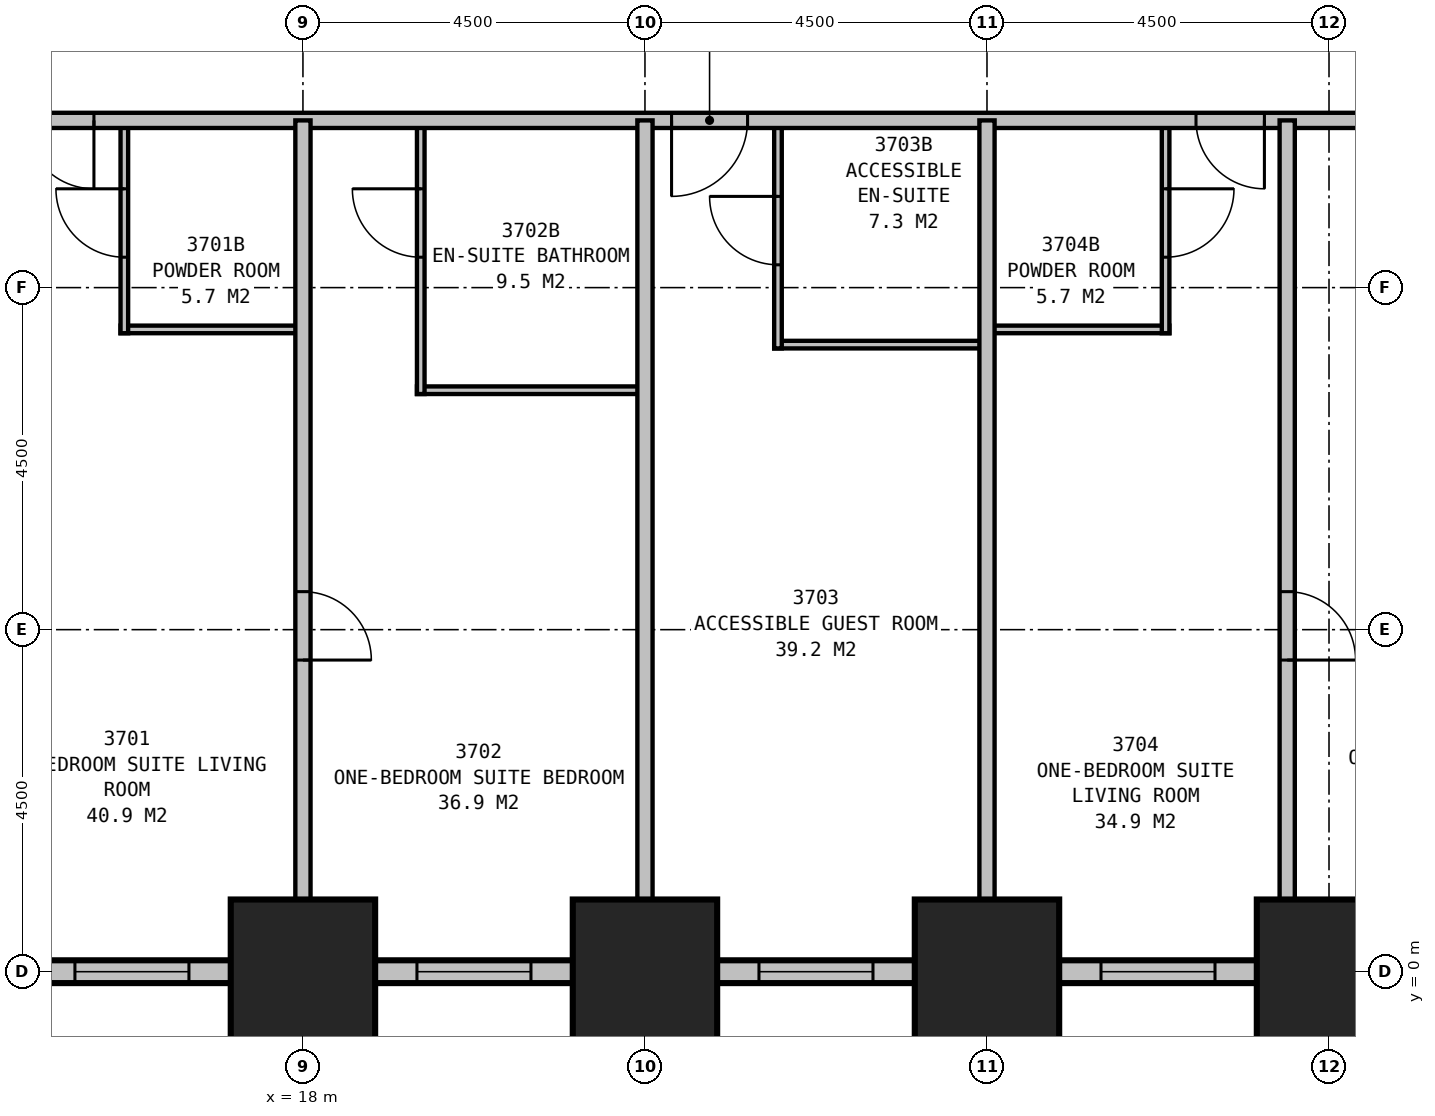
"""IFC4 building model, lengths in metres.
Left out: names, types, materials, properties, quantities, classifications, styles, units other than length and angle.
Written with IfcOpenShell. Run it as: python <this file> out.ifc"""

import sys

from ifc_helpers import new_model, si_unit, direction, frame, frame_2d, origin, origin_2d, place, context, subcontext, project, spatial, rectangle, extrude, element, fill, save


model = new_model("IFC4")
c1 = context("Model", 3, precision=1e-05, world=origin(), true_north=direction((0.0, 1.0)))
c2 = subcontext(c1, "Body", "Model", "MODEL_VIEW")
j1 = project(units=[si_unit("LENGTHUNIT", "METRE"), si_unit("PLANEANGLEUNIT", "RADIAN")], contexts=[c1])
p1 = place(None, origin())
s1 = spatial("IfcSite", under=j1, at=p1, CompositionType="ELEMENT")
p2 = place(p1, origin())
s2 = spatial("IfcBuilding", under=s1, at=p2, CompositionType="ELEMENT")
p3 = place(p2, frame((0.0, 0.0, 142.4)))
s3 = spatial("IfcBuildingStorey", under=s2, at=p3, CompositionType="ELEMENT", Elevation=142.4)
for number, where, z_axis, x_axis in (
    (1, (18.0, 0.0, 0.0), (0.0, 0.0, 1.0), (1.0, 0.0, 0.0)),
    (2, (22.5, 0.0, 0.0), (0.0, 0.0, 1.0), (1.0, 0.0, 0.0)),
    (3, (27.0, 0.0, 0.0), (0.0, 0.0, 1.0), (1.0, 0.0, 0.0)),
    (4, (31.5, 0.0, 0.0), (0.0, 0.0, 1.0), (1.0, 0.0, 0.0)),
):
    element("IfcColumn", number, at=place(p3, frame(where, z_axis=z_axis, x_axis=x_axis)), inside=s3, PredefinedType="COLUMN", context=c2, shape_type="SweptSolid", body=[
        extrude(rectangle(XDim=1.9, YDim=1.9, at=origin_2d()), origin(), (0.0, 0.0, 1.0), 3.5),
    ])
p4 = place(p3, frame((4.35, 0.0, 0.0), z_axis=(0.0, 0.0, 1.0), x_axis=(1.0, 0.0, 0.0)))
e5 = element("IfcWall", 5, at=p4, inside=s3, PredefinedType="STANDARD", context=c2, shape_type="SweptSolid", body=[
    extrude(rectangle(XDim=40.8, YDim=0.3, at=frame_2d((20.4, 0.0))), origin(), (0.0, 0.0, 1.0), 2.1),
])
p5 = place(p4, frame((1.65, 0.0, 0.5)))
e6 = element("IfcOpeningElement", 6, at=p5, cuts=e5, PredefinedType="OPENING", context=c2, shape_type="SweptSolid", body=[
    extrude(rectangle(XDim=1.5, YDim=1.4, at=frame_2d((0.75, 0.7))), frame((0.0, 0.16, 0.0), z_axis=(0.0, -1.0, 0.0), x_axis=(1.0, 0.0, 0.0)), (0.0, 0.0, 1.0), 0.32),
])
p6 = place(p4, frame((6.15, 0.0, 0.5)))
e7 = element("IfcOpeningElement", 7, at=p6, cuts=e5, PredefinedType="OPENING", context=c2, shape_type="SweptSolid", body=[
    extrude(rectangle(XDim=1.5, YDim=1.4, at=frame_2d((0.75, 0.7))), frame((0.0, 0.16, 0.0), z_axis=(0.0, -1.0, 0.0), x_axis=(1.0, 0.0, 0.0)), (0.0, 0.0, 1.0), 0.32),
])
p7 = place(p4, frame((10.65, 0.0, 0.5)))
e8 = element("IfcOpeningElement", 8, at=p7, cuts=e5, PredefinedType="OPENING", context=c2, shape_type="SweptSolid", body=[
    extrude(rectangle(XDim=1.5, YDim=1.4, at=frame_2d((0.75, 0.7))), frame((0.0, 0.16, 0.0), z_axis=(0.0, -1.0, 0.0), x_axis=(1.0, 0.0, 0.0)), (0.0, 0.0, 1.0), 0.32),
])
p8 = place(p4, frame((15.15, 0.0, 0.5)))
e9 = element("IfcOpeningElement", 9, at=p8, cuts=e5, PredefinedType="OPENING", context=c2, shape_type="SweptSolid", body=[
    extrude(rectangle(XDim=1.5, YDim=1.4, at=frame_2d((0.75, 0.7))), frame((0.0, 0.16, 0.0), z_axis=(0.0, -1.0, 0.0), x_axis=(1.0, 0.0, 0.0)), (0.0, 0.0, 1.0), 0.32),
])
p9 = place(p4, frame((19.65, 0.0, 0.5)))
e10 = element("IfcOpeningElement", 10, at=p9, cuts=e5, PredefinedType="OPENING", context=c2, shape_type="SweptSolid", body=[
    extrude(rectangle(XDim=1.5, YDim=1.4, at=frame_2d((0.75, 0.7))), frame((0.0, 0.16, 0.0), z_axis=(0.0, -1.0, 0.0), x_axis=(1.0, 0.0, 0.0)), (0.0, 0.0, 1.0), 0.32),
])
p10 = place(p4, frame((24.15, 0.0, 0.5)))
e11 = element("IfcOpeningElement", 11, at=p10, cuts=e5, PredefinedType="OPENING", context=c2, shape_type="SweptSolid", body=[
    extrude(rectangle(XDim=1.5, YDim=1.4, at=frame_2d((0.75, 0.7))), frame((0.0, 0.16, 0.0), z_axis=(0.0, -1.0, 0.0), x_axis=(1.0, 0.0, 0.0)), (0.0, 0.0, 1.0), 0.32),
])
p11 = place(p4, frame((28.65, 0.0, 0.5)))
e12 = element("IfcOpeningElement", 12, at=p11, cuts=e5, PredefinedType="OPENING", context=c2, shape_type="SweptSolid", body=[
    extrude(rectangle(XDim=1.5, YDim=1.4, at=frame_2d((0.75, 0.7))), frame((0.0, 0.16, 0.0), z_axis=(0.0, -1.0, 0.0), x_axis=(1.0, 0.0, 0.0)), (0.0, 0.0, 1.0), 0.32),
])
p12 = place(p4, frame((33.15, 0.0, 0.5)))
e13 = element("IfcOpeningElement", 13, at=p12, cuts=e5, PredefinedType="OPENING", context=c2, shape_type="SweptSolid", body=[
    extrude(rectangle(XDim=1.5, YDim=1.4, at=frame_2d((0.75, 0.7))), frame((0.0, 0.16, 0.0), z_axis=(0.0, -1.0, 0.0), x_axis=(1.0, 0.0, 0.0)), (0.0, 0.0, 1.0), 0.32),
])
p13 = place(p4, frame((37.65, 0.0, 0.5)))
e14 = element("IfcOpeningElement", 14, at=p13, cuts=e5, PredefinedType="OPENING", context=c2, shape_type="SweptSolid", body=[
    extrude(rectangle(XDim=1.5, YDim=1.4, at=frame_2d((0.75, 0.7))), frame((0.0, 0.16, 0.0), z_axis=(0.0, -1.0, 0.0), x_axis=(1.0, 0.0, 0.0)), (0.0, 0.0, 1.0), 0.32),
])
p14 = place(p3, frame((11.2, 11.2, 0.0), z_axis=(0.0, 0.0, 1.0), x_axis=(1.0, 0.0, 0.0)))
e15 = element("IfcWall", 15, at=p14, inside=s3, PredefinedType="PARTITIONING", context=c2, shape_type="SweptSolid", body=[
    extrude(rectangle(XDim=27.1, YDim=0.2, at=frame_2d((13.55, 0.0))), origin(), (0.0, 0.0, 1.0), 3.25),
])
p15 = place(p14, frame((4.05, 0.0, 0.0), z_axis=(0.0, 0.0, 1.0), x_axis=(-1.0, 0.0, 0.0)))
e16 = element("IfcOpeningElement", 16, at=p15, cuts=e15, PredefinedType="OPENING", context=c2, shape_type="SweptSolid", body=[
    extrude(rectangle(XDim=0.9, YDim=2.1, at=frame_2d((0.45, 1.05))), frame((0.0, 0.11, 0.0), z_axis=(0.0, -1.0, 0.0), x_axis=(1.0, 0.0, 0.0)), (0.0, 0.0, 1.0), 0.22),
])
p16 = place(p14, frame((12.65, 0.0, 0.0), z_axis=(0.0, 0.0, 1.0), x_axis=(-1.0, 0.0, 0.0)))
e17 = element("IfcOpeningElement", 17, at=p16, cuts=e15, PredefinedType="OPENING", context=c2, shape_type="SweptSolid", body=[
    extrude(rectangle(XDim=1.0, YDim=2.1, at=frame_2d((0.5, 1.05))), frame((0.0, 0.11, 0.0), z_axis=(0.0, -1.0, 0.0), x_axis=(1.0, 0.0, 0.0)), (0.0, 0.0, 1.0), 0.22),
])
p17 = place(p14, frame((19.45, 0.0, 0.0), z_axis=(0.0, 0.0, 1.0), x_axis=(-1.0, 0.0, 0.0)))
e18 = element("IfcOpeningElement", 18, at=p17, cuts=e15, PredefinedType="OPENING", context=c2, shape_type="SweptSolid", body=[
    extrude(rectangle(XDim=0.9, YDim=2.1, at=frame_2d((0.45, 1.05))), frame((0.0, 0.11, 0.0), z_axis=(0.0, -1.0, 0.0), x_axis=(1.0, 0.0, 0.0)), (0.0, 0.0, 1.0), 0.22),
])
p18 = place(p14, frame((1.6, 0.0, 0.0), z_axis=(0.0, 0.0, 1.0), x_axis=(-1.0, 0.0, 0.0)))
e19 = element("IfcOpeningElement", 19, at=p18, cuts=e15, PredefinedType="OPENING", context=c2, shape_type="SweptSolid", body=[
    extrude(rectangle(XDim=0.9, YDim=2.1, at=frame_2d((0.45, 1.05))), frame((0.0, 0.11, 0.0), z_axis=(0.0, -1.0, 0.0), x_axis=(1.0, 0.0, 0.0)), (0.0, 0.0, 1.0), 0.22),
])
p19 = place(p14, frame((26.4, 0.0, 0.0), z_axis=(0.0, 0.0, 1.0), x_axis=(-1.0, 0.0, 0.0)))
e20 = element("IfcOpeningElement", 20, at=p19, cuts=e15, PredefinedType="OPENING", context=c2, shape_type="SweptSolid", body=[
    extrude(rectangle(XDim=0.9, YDim=2.1, at=frame_2d((0.45, 1.05))), frame((0.0, 0.11, 0.0), z_axis=(0.0, -1.0, 0.0), x_axis=(1.0, 0.0, 0.0)), (0.0, 0.0, 1.0), 0.22),
])
p20 = place(p3, frame((18.0, 11.2, 0.0), z_axis=(0.0, 0.0, 1.0), x_axis=(0.0, -1.0, 0.0)))
e21 = element("IfcWall", 21, at=p20, inside=s3, PredefinedType="PARTITIONING", context=c2, shape_type="SweptSolid", body=[
    extrude(rectangle(XDim=11.2, YDim=0.2, at=frame_2d((5.6, 0.0))), origin(), (0.0, 0.0, 1.0), 2.2),
])
p21 = place(p20, frame((6.2, 0.0, 0.0)))
e22 = element("IfcOpeningElement", 22, at=p21, cuts=e21, PredefinedType="OPENING", context=c2, shape_type="SweptSolid", body=[
    extrude(rectangle(XDim=0.9, YDim=2.1, at=frame_2d((0.45, 1.05))), frame((0.0, 0.11, 0.0), z_axis=(0.0, -1.0, 0.0), x_axis=(1.0, 0.0, 0.0)), (0.0, 0.0, 1.0), 0.22),
])
for number, where, z_axis, x_axis in (
    (23, (22.5, 11.2, 0.0), (0.0, 0.0, 1.0), (0.0, -1.0, 0.0)),
    (24, (27.0, 11.2, 0.0), (0.0, 0.0, 1.0), (0.0, -1.0, 0.0)),
):
    element("IfcWall", number, at=place(p3, frame(where, z_axis=z_axis, x_axis=x_axis)), inside=s3, PredefinedType="PARTITIONING", context=c2, shape_type="SweptSolid", body=[
        extrude(rectangle(XDim=11.2, YDim=0.2, at=frame_2d((5.6, 0.0))), origin(), (0.0, 0.0, 1.0), 2.2),
    ])
p22 = place(p3, frame((30.95, 11.2, 0.0), z_axis=(0.0, 0.0, 1.0), x_axis=(0.0, -1.0, 0.0)))
e25 = element("IfcWall", 25, at=p22, inside=s3, PredefinedType="PARTITIONING", context=c2, shape_type="SweptSolid", body=[
    extrude(rectangle(XDim=11.2, YDim=0.2, at=frame_2d((5.6, 0.0))), origin(), (0.0, 0.0, 1.0), 2.2),
])
p23 = place(p22, frame((6.2, 0.0, 0.0)))
e26 = element("IfcOpeningElement", 26, at=p23, cuts=e25, PredefinedType="OPENING", context=c2, shape_type="SweptSolid", body=[
    extrude(rectangle(XDim=0.9, YDim=2.1, at=frame_2d((0.45, 1.05))), frame((0.0, 0.11, 0.0), z_axis=(0.0, -1.0, 0.0), x_axis=(1.0, 0.0, 0.0)), (0.0, 0.0, 1.0), 0.22),
])
p24 = place(p3, frame((15.6, 8.45, 0.0), z_axis=(0.0, 0.0, 1.0), x_axis=(1.0, 0.0, 0.0)))
e27 = element("IfcWall", 27, at=p24, inside=s3, PredefinedType="PLUMBINGWALL", context=c2, shape_type="SweptSolid", body=[
    extrude(rectangle(XDim=2.4, YDim=0.1, at=frame_2d((1.2, 0.0))), origin(), (0.0, 0.0, 1.0), 3.25),
])
p25 = place(p3, frame((15.65, 11.2, 0.0), z_axis=(0.0, 0.0, 1.0), x_axis=(0.0, -1.0, 0.0)))
e28 = element("IfcWall", 28, at=p25, inside=s3, PredefinedType="PLUMBINGWALL", context=c2, shape_type="SweptSolid", body=[
    extrude(rectangle(XDim=2.8, YDim=0.1, at=frame_2d((1.4, 0.0))), origin(), (0.0, 0.0, 1.0), 3.25),
])
p26 = place(p25, frame((1.8, 0.0, 0.0), z_axis=(0.0, 0.0, 1.0), x_axis=(-1.0, 0.0, 0.0)))
e29 = element("IfcOpeningElement", 29, at=p26, cuts=e28, PredefinedType="OPENING", context=c2, shape_type="SweptSolid", body=[
    extrude(rectangle(XDim=0.9, YDim=2.1, at=frame_2d((0.45, 1.05))), frame((0.0, 0.06, 0.0), z_axis=(0.0, -1.0, 0.0), x_axis=(1.0, 0.0, 0.0)), (0.0, 0.0, 1.0), 0.12),
])
p27 = place(p3, frame((19.5, 7.65, 0.0), z_axis=(0.0, 0.0, 1.0), x_axis=(1.0, 0.0, 0.0)))
e30 = element("IfcWall", 30, at=p27, inside=s3, PredefinedType="PLUMBINGWALL", context=c2, shape_type="SweptSolid", body=[
    extrude(rectangle(XDim=3.0, YDim=0.1, at=frame_2d((1.5, 0.0))), origin(), (0.0, 0.0, 1.0), 3.25),
])
p28 = place(p3, frame((19.55, 11.2, 0.0), z_axis=(0.0, 0.0, 1.0), x_axis=(0.0, -1.0, 0.0)))
e31 = element("IfcWall", 31, at=p28, inside=s3, PredefinedType="PLUMBINGWALL", context=c2, shape_type="SweptSolid", body=[
    extrude(rectangle(XDim=3.6, YDim=0.1, at=frame_2d((1.8, 0.0))), origin(), (0.0, 0.0, 1.0), 3.25),
])
p29 = place(p28, frame((1.8, 0.0, 0.0), z_axis=(0.0, 0.0, 1.0), x_axis=(-1.0, 0.0, 0.0)))
e32 = element("IfcOpeningElement", 32, at=p29, cuts=e31, PredefinedType="OPENING", context=c2, shape_type="SweptSolid", body=[
    extrude(rectangle(XDim=0.9, YDim=2.1, at=frame_2d((0.45, 1.05))), frame((0.0, 0.06, 0.0), z_axis=(0.0, -1.0, 0.0), x_axis=(1.0, 0.0, 0.0)), (0.0, 0.0, 1.0), 0.12),
])
p30 = place(p3, frame((24.2, 8.25, 0.0), z_axis=(0.0, 0.0, 1.0), x_axis=(1.0, 0.0, 0.0)))
e33 = element("IfcWall", 33, at=p30, inside=s3, PredefinedType="PLUMBINGWALL", context=c2, shape_type="SweptSolid", body=[
    extrude(rectangle(XDim=2.8, YDim=0.1, at=frame_2d((1.4, 0.0))), origin(), (0.0, 0.0, 1.0), 3.25),
])
p31 = place(p3, frame((24.25, 11.2, 0.0), z_axis=(0.0, 0.0, 1.0), x_axis=(0.0, -1.0, 0.0)))
e34 = element("IfcWall", 34, at=p31, inside=s3, PredefinedType="PLUMBINGWALL", context=c2, shape_type="SweptSolid", body=[
    extrude(rectangle(XDim=3.0, YDim=0.1, at=frame_2d((1.5, 0.0))), origin(), (0.0, 0.0, 1.0), 3.25),
])
p32 = place(p31, frame((1.9, 0.0, 0.0), z_axis=(0.0, 0.0, 1.0), x_axis=(-1.0, 0.0, 0.0)))
e35 = element("IfcOpeningElement", 35, at=p32, cuts=e34, PredefinedType="OPENING", context=c2, shape_type="SweptSolid", body=[
    extrude(rectangle(XDim=0.9, YDim=2.1, at=frame_2d((0.45, 1.05))), frame((0.0, 0.06, 0.0), z_axis=(0.0, -1.0, 0.0), x_axis=(1.0, 0.0, 0.0)), (0.0, 0.0, 1.0), 0.12),
])
p33 = place(p3, frame((27.0, 8.45, 0.0), z_axis=(0.0, 0.0, 1.0), x_axis=(1.0, 0.0, 0.0)))
e36 = element("IfcWall", 36, at=p33, inside=s3, PredefinedType="PLUMBINGWALL", context=c2, shape_type="SweptSolid", body=[
    extrude(rectangle(XDim=2.4, YDim=0.1, at=frame_2d((1.2, 0.0))), origin(), (0.0, 0.0, 1.0), 3.25),
])
p34 = place(p3, frame((29.35, 11.2, 0.0), z_axis=(0.0, 0.0, 1.0), x_axis=(0.0, -1.0, 0.0)))
e37 = element("IfcWall", 37, at=p34, inside=s3, PredefinedType="PLUMBINGWALL", context=c2, shape_type="SweptSolid", body=[
    extrude(rectangle(XDim=2.8, YDim=0.1, at=frame_2d((1.4, 0.0))), origin(), (0.0, 0.0, 1.0), 3.25),
])
p35 = place(p34, frame((0.9, 0.0, 0.0)))
e38 = element("IfcOpeningElement", 38, at=p35, cuts=e37, PredefinedType="OPENING", context=c2, shape_type="SweptSolid", body=[
    extrude(rectangle(XDim=0.9, YDim=2.1, at=frame_2d((0.45, 1.05))), frame((0.0, 0.06, 0.0), z_axis=(0.0, -1.0, 0.0), x_axis=(1.0, 0.0, 0.0)), (0.0, 0.0, 1.0), 0.12),
])
p36 = place(p7, origin())
e39 = element("IfcWindow", 39, at=p36, inside=s3, PartitioningType="SINGLE_PANEL", PredefinedType="WINDOW", context=c2, shape_type="SweptSolid", body=[
    extrude(rectangle(XDim=1.5, YDim=1.4, at=frame_2d((0.75, 0.7))), frame((0.0, 0.03, 0.0), z_axis=(0.0, -1.0, 0.0), x_axis=(1.0, 0.0, 0.0)), (0.0, 0.0, 1.0), 0.06),
])
fill(e8, e39)
p37 = place(p8, origin())
e40 = element("IfcWindow", 40, at=p37, inside=s3, PartitioningType="SINGLE_PANEL", PredefinedType="WINDOW", context=c2, shape_type="SweptSolid", body=[
    extrude(rectangle(XDim=1.5, YDim=1.4, at=frame_2d((0.75, 0.7))), frame((0.0, 0.03, 0.0), z_axis=(0.0, -1.0, 0.0), x_axis=(1.0, 0.0, 0.0)), (0.0, 0.0, 1.0), 0.06),
])
fill(e9, e40)
p38 = place(p9, origin())
e41 = element("IfcWindow", 41, at=p38, inside=s3, PartitioningType="SINGLE_PANEL", PredefinedType="WINDOW", context=c2, shape_type="SweptSolid", body=[
    extrude(rectangle(XDim=1.5, YDim=1.4, at=frame_2d((0.75, 0.7))), frame((0.0, 0.03, 0.0), z_axis=(0.0, -1.0, 0.0), x_axis=(1.0, 0.0, 0.0)), (0.0, 0.0, 1.0), 0.06),
])
fill(e10, e41)
p39 = place(p10, origin())
e42 = element("IfcWindow", 42, at=p39, inside=s3, PartitioningType="SINGLE_PANEL", PredefinedType="WINDOW", context=c2, shape_type="SweptSolid", body=[
    extrude(rectangle(XDim=1.5, YDim=1.4, at=frame_2d((0.75, 0.7))), frame((0.0, 0.03, 0.0), z_axis=(0.0, -1.0, 0.0), x_axis=(1.0, 0.0, 0.0)), (0.0, 0.0, 1.0), 0.06),
])
fill(e11, e42)
p40 = place(p15, origin())
e43 = element("IfcDoor", 43, at=p40, inside=s3, OperationType="SINGLE_SWING_LEFT", PredefinedType="DOOR", context=c2, shape_type="SweptSolid", body=[
    extrude(rectangle(XDim=0.9, YDim=2.1, at=frame_2d((0.45, 1.05))), frame((0.0, 0.025, 0.0), z_axis=(0.0, -1.0, 0.0), x_axis=(1.0, 0.0, 0.0)), (0.0, 0.0, 1.0), 0.05),
])
fill(e16, e43)
p41 = place(p16, origin())
e44 = element("IfcDoor", 44, at=p41, inside=s3, OperationType="SINGLE_SWING_RIGHT", PredefinedType="DOOR", context=c2, shape_type="SweptSolid", body=[
    extrude(rectangle(XDim=1.0, YDim=2.1, at=frame_2d((0.5, 1.05))), frame((0.0, 0.025, 0.0), z_axis=(0.0, -1.0, 0.0), x_axis=(1.0, 0.0, 0.0)), (0.0, 0.0, 1.0), 0.05),
])
fill(e17, e44)
p42 = place(p17, origin())
e45 = element("IfcDoor", 45, at=p42, inside=s3, OperationType="SINGLE_SWING_LEFT", PredefinedType="DOOR", context=c2, shape_type="SweptSolid", body=[
    extrude(rectangle(XDim=0.9, YDim=2.1, at=frame_2d((0.45, 1.05))), frame((0.0, 0.025, 0.0), z_axis=(0.0, -1.0, 0.0), x_axis=(1.0, 0.0, 0.0)), (0.0, 0.0, 1.0), 0.05),
])
fill(e18, e45)
p43 = place(p21, origin())
e46 = element("IfcDoor", 46, at=p43, inside=s3, OperationType="SINGLE_SWING_RIGHT", PredefinedType="DOOR", context=c2, shape_type="SweptSolid", body=[
    extrude(rectangle(XDim=0.9, YDim=2.1, at=frame_2d((0.45, 1.05))), frame((0.0, 0.025, 0.0), z_axis=(0.0, -1.0, 0.0), x_axis=(1.0, 0.0, 0.0)), (0.0, 0.0, 1.0), 0.05),
])
fill(e22, e46)
p44 = place(p23, origin())
e47 = element("IfcDoor", 47, at=p44, inside=s3, OperationType="SINGLE_SWING_RIGHT", PredefinedType="DOOR", context=c2, shape_type="SweptSolid", body=[
    extrude(rectangle(XDim=0.9, YDim=2.1, at=frame_2d((0.45, 1.05))), frame((0.0, 0.025, 0.0), z_axis=(0.0, -1.0, 0.0), x_axis=(1.0, 0.0, 0.0)), (0.0, 0.0, 1.0), 0.05),
])
fill(e26, e47)
p45 = place(p26, origin())
e48 = element("IfcDoor", 48, at=p45, inside=s3, OperationType="SINGLE_SWING_RIGHT", PredefinedType="DOOR", context=c2, shape_type="SweptSolid", body=[
    extrude(rectangle(XDim=0.9, YDim=2.1, at=frame_2d((0.45, 1.05))), frame((0.0, 0.025, 0.0), z_axis=(0.0, -1.0, 0.0), x_axis=(1.0, 0.0, 0.0)), (0.0, 0.0, 1.0), 0.05),
])
fill(e29, e48)
p46 = place(p29, origin())
e49 = element("IfcDoor", 49, at=p46, inside=s3, OperationType="SINGLE_SWING_RIGHT", PredefinedType="DOOR", context=c2, shape_type="SweptSolid", body=[
    extrude(rectangle(XDim=0.9, YDim=2.1, at=frame_2d((0.45, 1.05))), frame((0.0, 0.025, 0.0), z_axis=(0.0, -1.0, 0.0), x_axis=(1.0, 0.0, 0.0)), (0.0, 0.0, 1.0), 0.05),
])
fill(e32, e49)
p47 = place(p32, origin())
e50 = element("IfcDoor", 50, at=p47, inside=s3, OperationType="SINGLE_SWING_RIGHT", PredefinedType="DOOR", context=c2, shape_type="SweptSolid", body=[
    extrude(rectangle(XDim=0.9, YDim=2.1, at=frame_2d((0.45, 1.05))), frame((0.0, 0.025, 0.0), z_axis=(0.0, -1.0, 0.0), x_axis=(1.0, 0.0, 0.0)), (0.0, 0.0, 1.0), 0.05),
])
fill(e35, e50)
p48 = place(p35, origin())
e51 = element("IfcDoor", 51, at=p48, inside=s3, OperationType="SINGLE_SWING_LEFT", PredefinedType="DOOR", context=c2, shape_type="SweptSolid", body=[
    extrude(rectangle(XDim=0.9, YDim=2.1, at=frame_2d((0.45, 1.05))), frame((0.0, 0.025, 0.0), z_axis=(0.0, -1.0, 0.0), x_axis=(1.0, 0.0, 0.0)), (0.0, 0.0, 1.0), 0.05),
])
fill(e38, e51)
save(model, sys.argv[1])
